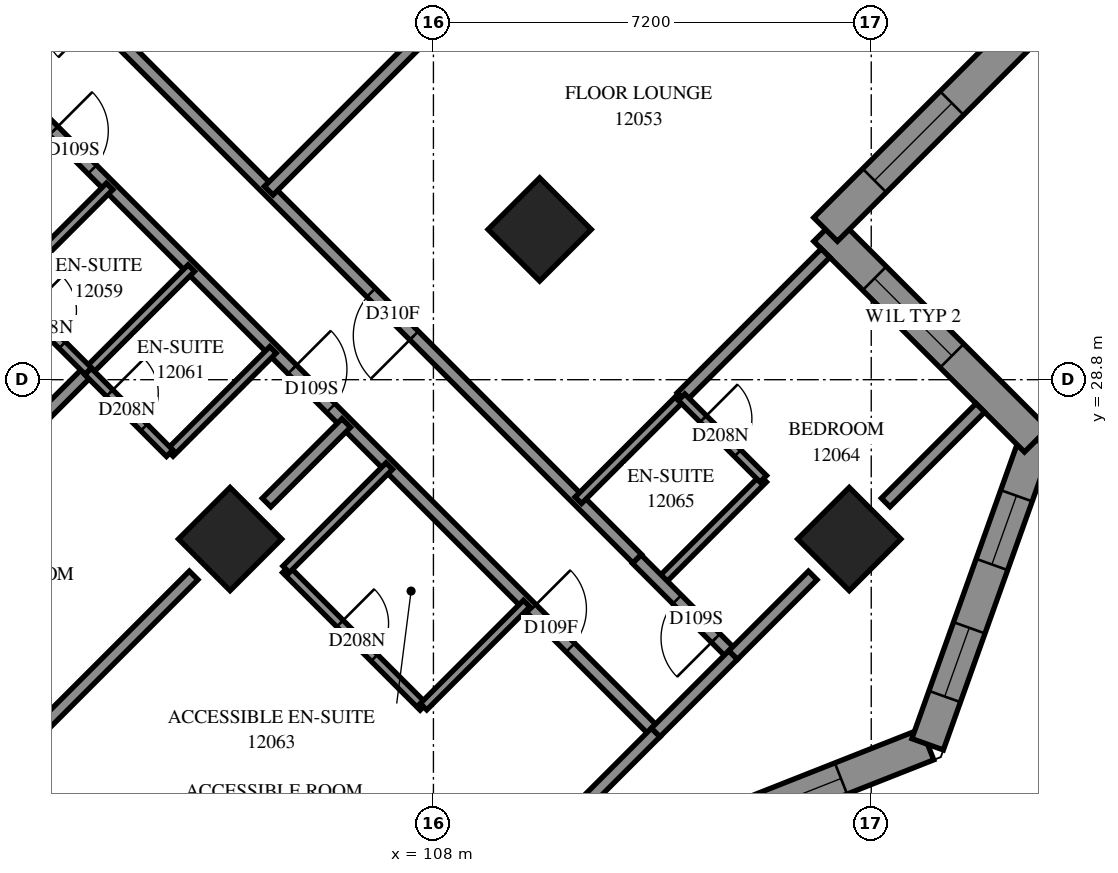
"""IFC4 building model, lengths in metres.
Left out: names, types, materials, properties, quantities, classifications, styles, units other than length and angle.
Written with IfcOpenShell. Run it as: python <this file> out.ifc"""

import sys

from ifc_helpers import new_model, si_unit, direction, frame, frame_2d, origin, origin_2d, place, context, subcontext, project, spatial, polyline, rectangle, outline, extrude, element, fill, save


model = new_model("IFC4")
c1 = context("Model", 3, precision=1e-05, world=origin(), true_north=direction((0.0, 1.0)))
c2 = subcontext(c1, "Body", "Model", "MODEL_VIEW")
j1 = project(units=[si_unit("LENGTHUNIT", "METRE"), si_unit("PLANEANGLEUNIT", "RADIAN")], contexts=[c1])
p1 = place(None, origin())
s1 = spatial("IfcSite", under=j1, at=p1, CompositionType="ELEMENT")
p2 = place(p1, origin())
s2 = spatial("IfcBuilding", under=s1, at=p2, CompositionType="ELEMENT")
p3 = place(p2, frame((0.0, 0.0, 47.4)))
s3 = spatial("IfcBuildingStorey", under=s2, at=p3, CompositionType="ELEMENT", Elevation=47.4)
for number, where, z_axis, x_axis in (
    (1, (109.747, 31.271, 0.0), (0.0, 0.0, 1.0), (0.707, -0.707, 0.0)),
    (2, (104.656, 26.18, 0.0), (0.0, 0.0, 1.0), (0.707, -0.707, 0.0)),
    (3, (114.838, 26.18, 0.0), (0.0, 0.0, 1.0), (0.707, -0.707, 0.0)),
):
    element("IfcColumn", number, at=place(p3, frame(where, z_axis=z_axis, x_axis=x_axis)), inside=s3, PredefinedType="COLUMN", context=c2, shape_type="SweptSolid", body=[
        extrude(rectangle(XDim=1.2, YDim=1.2, at=origin_2d()), origin(), (0.0, 0.0, 1.0), 3.1),
    ])
p4 = place(p3, frame((110.991, 20.776, 0.0), z_axis=(0.0, 0.0, 1.0), x_axis=(0.9301285259, 0.3672341559, 0.0)))
e4 = element("IfcWall", 4, at=p4, inside=s3, PredefinedType="SOLIDWALL", context=c2, shape_type="SweptSolid", body=[
    extrude(outline(polyline([(0.119, -0.275), (5.646, -0.275), (5.397, 0.275), (-0.119, 0.275), (0.119, -0.275)])), origin(), (0.0, 0.0, 1.0), 3.1),
])
p5 = place(p4, frame((1.19, 0.0, 0.5)))
e5 = element("IfcOpeningElement", 5, at=p5, cuts=e4, PredefinedType="OPENING", context=c2, shape_type="SweptSolid", body=[
    extrude(rectangle(XDim=2.8, YDim=2.45, at=frame_2d((1.4, 1.225))), frame((0.0, 0.285, 0.0), z_axis=(0.0, -1.0, 0.0), x_axis=(1.0, 0.0, 0.0)), (0.0, 0.0, 1.0), 0.57),
])
p6 = place(p3, frame((116.127, 22.804, 0.0), z_axis=(0.0, 0.0, 1.0), x_axis=(0.3366083403, 0.9416447447, 0.0)))
e6 = element("IfcWall", 6, at=p6, inside=s3, PredefinedType="SOLIDWALL", context=c2, shape_type="SweptSolid", body=[
    extrude(outline(polyline([(-0.125, -0.275), (5.485, -0.275), (5.137, 0.275), (0.125, 0.275), (-0.125, -0.275)])), origin(), (0.0, 0.0, 1.0), 3.1),
])
p7 = place(p6, frame((0.835, 0.0, 0.5)))
e7 = element("IfcOpeningElement", 7, at=p7, cuts=e6, PredefinedType="OPENING", context=c2, shape_type="SweptSolid", body=[
    extrude(rectangle(XDim=1.2, YDim=2.45, at=frame_2d((0.6, 1.225))), frame((0.0, 0.285, 0.0), z_axis=(0.0, -1.0, 0.0), x_axis=(1.0, 0.0, 0.0)), (0.0, 0.0, 1.0), 0.57),
])
p8 = place(p6, frame((3.141, 0.0, 0.5)))
e8 = element("IfcOpeningElement", 8, at=p8, cuts=e6, PredefinedType="OPENING", context=c2, shape_type="SweptSolid", body=[
    extrude(rectangle(XDim=1.2, YDim=2.45, at=frame_2d((0.6, 1.225))), frame((0.0, 0.285, 0.0), z_axis=(0.0, -1.0, 0.0), x_axis=(1.0, 0.0, 0.0)), (0.0, 0.0, 1.0), 0.57),
])
p9 = place(p3, frame((117.915, 27.805, 0.0), z_axis=(0.0, 0.0, 1.0), x_axis=(-0.7070965789, 0.7071169833, 0.0)))
e9 = element("IfcWall", 9, at=p9, inside=s3, PredefinedType="SOLIDWALL", context=c2, shape_type="SweptSolid", body=[
    extrude(outline(polyline([(-0.174, -0.275), (4.626, -0.275), (5.176, 0.275), (0.174, 0.275), (-0.174, -0.275)])), origin(), (0.0, 0.0, 1.0), 3.1),
])
p10 = place(p9, frame((1.963, 0.0, 0.6)))
e10 = element("IfcOpeningElement", 10, at=p10, cuts=e9, PredefinedType="OPENING", context=c2, shape_type="SweptSolid", body=[
    extrude(rectangle(XDim=1.8, YDim=1.9, at=frame_2d((0.9, 0.95))), frame((0.0, 0.285, 0.0), z_axis=(0.0, -1.0, 0.0), x_axis=(1.0, 0.0, 0.0)), (0.0, 0.0, 1.0), 0.57),
])
p11 = place(p3, frame((114.449, 31.271, 0.0), z_axis=(0.0, 0.0, 1.0), x_axis=(0.7070981337, 0.7071154285, 0.0)))
e11 = element("IfcWall", 11, at=p11, inside=s3, PredefinedType="SOLIDWALL", context=c2, shape_type="SweptSolid", body=[
    extrude(outline(polyline([(0.275, -0.275), (6.157, -0.275), (5.407, 0.275), (-0.275, 0.275), (0.275, -0.275)])), origin(), (0.0, 0.0, 1.0), 3.1),
])
p12 = place(p11, frame((1.137, 0.0, 0.6)))
e12 = element("IfcOpeningElement", 12, at=p12, cuts=e11, PredefinedType="OPENING", context=c2, shape_type="SweptSolid", body=[
    extrude(rectangle(XDim=1.8, YDim=1.9, at=frame_2d((0.9, 0.95))), frame((0.0, 0.285, 0.0), z_axis=(0.0, -1.0, 0.0), x_axis=(1.0, 0.0, 0.0)), (0.0, 0.0, 1.0), 0.57),
])
p13 = place(p3, frame((93.481, 41.167, 0.0), z_axis=(0.0, 0.0, 1.0), x_axis=(0.7071067812, -0.7071067812, 0.0)))
e13 = element("IfcWall", 13, at=p13, inside=s3, PredefinedType="PARTITIONING", context=c2, shape_type="SweptSolid", body=[
    extrude(rectangle(XDim=25.699, YDim=0.2, at=frame_2d((12.85, 0.0))), origin(), (0.0, 0.0, 1.0), 3.1),
])
p14 = place(p13, frame((2.8, 0.0, 0.0)))
e14 = element("IfcOpeningElement", 14, at=p14, cuts=e13, PredefinedType="OPENING", context=c2, shape_type="SweptSolid", body=[
    extrude(rectangle(XDim=0.9, YDim=2.1, at=frame_2d((0.45, 1.05))), frame((0.0, 0.11, 0.0), z_axis=(0.0, -1.0, 0.0), x_axis=(1.0, 0.0, 0.0)), (0.0, 0.0, 1.0), 0.22),
])
p15 = place(p13, frame((9.948, 0.0, 0.0)))
e15 = element("IfcOpeningElement", 15, at=p15, cuts=e13, PredefinedType="OPENING", context=c2, shape_type="SweptSolid", body=[
    extrude(rectangle(XDim=0.9, YDim=2.1, at=frame_2d((0.45, 1.05))), frame((0.0, 0.11, 0.0), z_axis=(0.0, -1.0, 0.0), x_axis=(1.0, 0.0, 0.0)), (0.0, 0.0, 1.0), 0.22),
])
p16 = place(p13, frame((11.7, 0.0, 0.0)))
e16 = element("IfcOpeningElement", 16, at=p16, cuts=e13, PredefinedType="OPENING", context=c2, shape_type="SweptSolid", body=[
    extrude(rectangle(XDim=0.9, YDim=2.1, at=frame_2d((0.45, 1.05))), frame((0.0, 0.11, 0.0), z_axis=(0.0, -1.0, 0.0), x_axis=(1.0, 0.0, 0.0)), (0.0, 0.0, 1.0), 0.22),
])
p17 = place(p13, frame((17.25, 0.0, 0.0)))
e17 = element("IfcOpeningElement", 17, at=p17, cuts=e13, PredefinedType="OPENING", context=c2, shape_type="SweptSolid", body=[
    extrude(rectangle(XDim=0.9, YDim=2.1, at=frame_2d((0.45, 1.05))), frame((0.0, 0.11, 0.0), z_axis=(0.0, -1.0, 0.0), x_axis=(1.0, 0.0, 0.0)), (0.0, 0.0, 1.0), 0.22),
])
p18 = place(p13, frame((22.82, 0.0, 0.0)))
e18 = element("IfcOpeningElement", 18, at=p18, cuts=e13, PredefinedType="OPENING", context=c2, shape_type="SweptSolid", body=[
    extrude(rectangle(XDim=0.9, YDim=2.1, at=frame_2d((0.45, 1.05))), frame((0.0, 0.11, 0.0), z_axis=(0.0, -1.0, 0.0), x_axis=(1.0, 0.0, 0.0)), (0.0, 0.0, 1.0), 0.22),
])
p19 = place(p3, frame((111.352, 25.855, 0.0), z_axis=(0.0, 0.0, 1.0), x_axis=(-0.7070418597, 0.7071716967, 0.0)))
e19 = element("IfcWall", 19, at=p19, inside=s3, PredefinedType="PARTITIONING", context=c2, shape_type="SweptSolid", body=[
    extrude(rectangle(XDim=13.864, YDim=0.2, at=frame_2d((6.932, 0.0))), origin(), (0.0, 0.0, 1.0), 3.1),
])
p20 = place(p19, frame((12.564, 0.0, 0.0)))
e20 = element("IfcOpeningElement", 20, at=p20, cuts=e19, PredefinedType="OPENING", context=c2, shape_type="SweptSolid", body=[
    extrude(rectangle(XDim=0.9, YDim=2.1, at=frame_2d((0.45, 1.05))), frame((0.0, 0.11, 0.0), z_axis=(0.0, -1.0, 0.0), x_axis=(1.0, 0.0, 0.0)), (0.0, 0.0, 1.0), 0.22),
])
p21 = place(p19, frame((5.19, 0.0, 0.0)))
e21 = element("IfcOpeningElement", 21, at=p21, cuts=e19, PredefinedType="OPENING", context=c2, shape_type="SweptSolid", body=[
    extrude(rectangle(XDim=1.0, YDim=2.1, at=frame_2d((0.5, 1.05))), frame((0.0, 0.11, 0.0), z_axis=(0.0, -1.0, 0.0), x_axis=(1.0, 0.0, 0.0)), (0.0, 0.0, 1.0), 0.22),
])
p22 = place(p3, frame((105.292, 31.908, 0.0), z_axis=(0.0, 0.0, 1.0), x_axis=(0.7071067812, 0.7071067812, 0.0)))
e22 = element("IfcWall", 22, at=p22, inside=s3, PredefinedType="PARTITIONING", context=c2, shape_type="SweptSolid", body=[
    extrude(rectangle(XDim=10.979, YDim=0.2, at=frame_2d((5.49, 0.0))), origin(), (0.0, 0.0, 1.0), 3.1),
])
p23 = place(p3, frame((96.528, 23.144, 0.0), z_axis=(0.0, 0.0, 1.0), x_axis=(0.7071067812, 0.7071067812, 0.0)))
e23 = element("IfcWall", 23, at=p23, inside=s3, PredefinedType="PARTITIONING", context=c2, shape_type="SweptSolid", body=[
    extrude(rectangle(XDim=8.195, YDim=0.2, at=frame_2d((4.098, 0.0))), origin(), (0.0, 0.0, 1.0), 3.1),
])
p24 = place(p3, frame((100.162, 21.688, 0.0), z_axis=(0.0, 0.0, 1.0), x_axis=(0.7071067812, 0.7071067812, 0.0)))
e24 = element("IfcWall", 24, at=p24, inside=s3, PredefinedType="PARTITIONING", context=c2, shape_type="SweptSolid", body=[
    extrude(rectangle(XDim=5.507, YDim=0.2, at=frame_2d((2.753, 0.0))), origin(), (0.0, 0.0, 1.0), 3.1),
])
p25 = place(p3, frame((112.079, 28.513, 0.0), z_axis=(0.0, 0.0, 1.0), x_axis=(0.7071067812, 0.7071067812, 0.0)))
e25 = element("IfcWall", 25, at=p25, inside=s3, PredefinedType="PARTITIONING", context=c2, shape_type="SweptSolid", body=[
    extrude(rectangle(XDim=3.351, YDim=0.2, at=frame_2d((1.675, 0.0))), origin(), (0.0, 0.0, 1.0), 3.1),
])
p26 = place(p3, frame((105.573, 25.681, 0.0), z_axis=(0.0, 0.0, 1.0), x_axis=(0.7071067812, -0.7071067812, 0.0)))
e26 = element("IfcWall", 26, at=p26, inside=s3, PredefinedType="PARTITIONING", context=c2, shape_type="SweptSolid", body=[
    extrude(rectangle(XDim=3.199, YDim=0.15, at=frame_2d((1.599, 0.0))), origin(), (0.0, 0.0, 1.0), 3.1),
])
p27 = place(p26, frame((1.258, 0.0, 0.0)))
e27 = element("IfcOpeningElement", 27, at=p27, cuts=e26, PredefinedType="OPENING", context=c2, shape_type="SweptSolid", body=[
    extrude(rectangle(XDim=0.8, YDim=2.1, at=frame_2d((0.4, 1.05))), frame((0.0, 0.085, 0.0), z_axis=(0.0, -1.0, 0.0), x_axis=(1.0, 0.0, 0.0)), (0.0, 0.0, 1.0), 0.17),
])
for number, where, z_axis, x_axis in (
    (28, (100.977, 30.281, 0.0), (0.0, 0.0, 1.0), (0.707, 0.707, 0.0)),
    (29, (111.725, 25.473, 0.0), (0.0, 0.0, 1.0), (0.707, 0.707, 0.0)),
):
    element("IfcWall", number, at=place(p3, frame(where, z_axis=z_axis, x_axis=x_axis)), inside=s3, PredefinedType="PARTITIONING", context=c2, shape_type="SweptSolid", body=[
        extrude(rectangle(XDim=2.401, YDim=0.15, at=frame_2d((1.201, 0.0))), origin(), (0.0, 0.0, 1.0), 3.1),
    ])
p28 = place(p3, frame((105.578, 25.682, 0.0), z_axis=(0.0, 0.0, 1.0), x_axis=(0.706689978, 0.7075233388, 0.0)))
e30 = element("IfcWall", 30, at=p28, inside=s3, PredefinedType="PARTITIONING", context=c2, shape_type="SweptSolid", body=[
    extrude(rectangle(XDim=2.4, YDim=0.15, at=frame_2d((1.2, 0.0))), origin(), (0.0, 0.0, 1.0), 3.1),
])
for number, where, z_axis, x_axis in (
    (31, (110.383, 26.817, 0.0), (0.0, 0.0, 1.0), (0.707, 0.707, 0.0)),
    (32, (102.323, 28.939, 0.0), (0.0, 0.0, 1.0), (0.707, 0.707, 0.0)),
    (33, (103.665, 27.595, 0.0), (0.0, 0.0, 1.0), (0.707, 0.707, 0.0)),
    (34, (107.837, 23.423, 0.0), (0.0, 0.0, 1.0), (0.707, 0.707, 0.0)),
):
    element("IfcWall", number, at=place(p3, frame(where, z_axis=z_axis, x_axis=x_axis)), inside=s3, PredefinedType="PARTITIONING", context=c2, shape_type="SweptSolid", body=[
        extrude(rectangle(XDim=2.398, YDim=0.15, at=frame_2d((1.199, 0.0))), origin(), (0.0, 0.0, 1.0), 3.1),
    ])
p29 = place(p3, frame((112.925, 24.267, 0.0), z_axis=(0.0, 0.0, 1.0), x_axis=(-0.7068383786, 0.707375082, 0.0)))
e35 = element("IfcWall", 35, at=p29, inside=s3, PredefinedType="PARTITIONING", context=c2, shape_type="SweptSolid", body=[
    extrude(rectangle(XDim=2.236, YDim=0.2, at=frame_2d((1.118, 0.0))), origin(), (0.0, 0.0, 1.0), 3.1),
])
p30 = place(p29, frame((0.4, 0.0, 0.0)))
e36 = element("IfcOpeningElement", 36, at=p30, cuts=e35, PredefinedType="OPENING", context=c2, shape_type="SweptSolid", body=[
    extrude(rectangle(XDim=0.9, YDim=2.1, at=frame_2d((0.45, 1.05))), frame((0.0, 0.11, 0.0), z_axis=(0.0, -1.0, 0.0), x_axis=(1.0, 0.0, 0.0)), (0.0, 0.0, 1.0), 0.22),
])
p31 = place(p3, frame((115.438, 26.78, 0.0), z_axis=(0.0, 0.0, 1.0), x_axis=(0.7071067812, 0.7071067812, 0.0)))
e37 = element("IfcWall", 37, at=p31, inside=s3, PredefinedType="PARTITIONING", context=c2, shape_type="SweptSolid", body=[
    extrude(rectangle(XDim=2.201, YDim=0.2, at=frame_2d((1.101, 0.0))), origin(), (0.0, 0.0, 1.0), 3.1),
])
p32 = place(p3, frame((100.981, 30.283, 0.0), z_axis=(0.0, 0.0, 1.0), x_axis=(0.7076330979, -0.7065800724, 0.0)))
e38 = element("IfcWall", 38, at=p32, inside=s3, PredefinedType="PARTITIONING", context=c2, shape_type="SweptSolid", body=[
    extrude(rectangle(XDim=1.899, YDim=0.15, at=frame_2d((0.95, 0.0))), origin(), (0.0, 0.0, 1.0), 3.1),
])
p33 = place(p32, frame((0.493, 0.0, 0.0)))
e39 = element("IfcOpeningElement", 39, at=p33, cuts=e38, PredefinedType="OPENING", context=c2, shape_type="SweptSolid", body=[
    extrude(rectangle(XDim=0.8, YDim=2.1, at=frame_2d((0.4, 1.05))), frame((0.0, 0.085, 0.0), z_axis=(0.0, -1.0, 0.0), x_axis=(1.0, 0.0, 0.0)), (0.0, 0.0, 1.0), 0.17),
])
p34 = place(p3, frame((102.321, 28.935, 0.0), z_axis=(0.0, 0.0, 1.0), x_axis=(0.7065800724, -0.7076330979, 0.0)))
e40 = element("IfcWall", 40, at=p34, inside=s3, PredefinedType="PARTITIONING", context=c2, shape_type="SweptSolid", body=[
    extrude(rectangle(XDim=1.899, YDim=0.15, at=frame_2d((0.95, 0.0))), origin(), (0.0, 0.0, 1.0), 3.1),
])
p35 = place(p34, frame((0.501, 0.0, 0.0)))
e41 = element("IfcOpeningElement", 41, at=p35, cuts=e40, PredefinedType="OPENING", context=c2, shape_type="SweptSolid", body=[
    extrude(rectangle(XDim=0.8, YDim=2.1, at=frame_2d((0.4, 1.05))), frame((0.0, 0.085, 0.0), z_axis=(0.0, -1.0, 0.0), x_axis=(1.0, 0.0, 0.0)), (0.0, 0.0, 1.0), 0.17),
])
p36 = place(p3, frame((112.08, 28.512, 0.0), z_axis=(0.0, 0.0, 1.0), x_axis=(0.7076330979, -0.7065800724, 0.0)))
e42 = element("IfcWall", 42, at=p36, inside=s3, PredefinedType="PARTITIONING", context=c2, shape_type="SweptSolid", body=[
    extrude(rectangle(XDim=1.899, YDim=0.15, at=frame_2d((0.95, 0.0))), origin(), (0.0, 0.0, 1.0), 3.1),
])
p37 = place(p36, frame((0.505, 0.0, 0.0)))
e43 = element("IfcOpeningElement", 43, at=p37, cuts=e42, PredefinedType="OPENING", context=c2, shape_type="SweptSolid", body=[
    extrude(rectangle(XDim=0.8, YDim=2.1, at=frame_2d((0.4, 1.05))), frame((0.0, 0.085, 0.0), z_axis=(0.0, -1.0, 0.0), x_axis=(1.0, 0.0, 0.0)), (0.0, 0.0, 1.0), 0.17),
])
for number, where, z_axis, x_axis in (
    (44, (110.346, 21.689, 0.0), (0.0, 0.0, 1.0), (0.707, 0.707, 0.0)),
    (45, (112.927, 24.27, 0.0), (0.0, 0.0, 1.0), (0.707, 0.707, 0.0)),
):
    element("IfcWall", number, at=place(p3, frame(where, z_axis=z_axis, x_axis=x_axis)), inside=s3, PredefinedType="PARTITIONING", context=c2, shape_type="SweptSolid", body=[
        extrude(rectangle(XDim=1.853, YDim=0.2, at=frame_2d((0.926, 0.0))), origin(), (0.0, 0.0, 1.0), 2.6),
    ])
p38 = place(p3, frame((105.256, 26.78, 0.0), z_axis=(0.0, 0.0, 1.0), x_axis=(0.7076467632, 0.7065663865, 0.0)))
e46 = element("IfcWall", 46, at=p38, inside=s3, PredefinedType="PARTITIONING", context=c2, shape_type="SweptSolid", body=[
    extrude(rectangle(XDim=1.851, YDim=0.2, at=frame_2d((0.926, 0.0))), origin(), (0.0, 0.0, 1.0), 3.1),
])
p39 = place(p3, frame((111.656, 22.998, 0.0), z_axis=(0.0, 0.0, 1.0), x_axis=(0.7071067812, 0.7071067812, 0.0)))
e47 = element("IfcWall", 47, at=p39, inside=s3, PredefinedType="PARTITIONING", context=c2, shape_type="SweptSolid", body=[
    extrude(rectangle(XDim=1.799, YDim=0.2, at=frame_2d((0.899, 0.0))), origin(), (0.0, 0.0, 1.0), 2.6),
])
p40 = place(p5, origin())
e48 = element("IfcWindow", 48, at=p40, inside=s3, PartitioningType="SINGLE_PANEL", PredefinedType="WINDOW", context=c2, shape_type="SweptSolid", body=[
    extrude(rectangle(XDim=2.8, YDim=2.45, at=frame_2d((1.4, 1.225))), frame((0.0, 0.155, 0.0), z_axis=(0.0, -1.0, 0.0), x_axis=(1.0, 0.0, 0.0)), (0.0, 0.0, 1.0), 0.06),
])
fill(e5, e48)
p41 = place(p7, origin())
e49 = element("IfcWindow", 49, at=p41, inside=s3, PartitioningType="SINGLE_PANEL", PredefinedType="WINDOW", context=c2, shape_type="SweptSolid", body=[
    extrude(rectangle(XDim=1.2, YDim=2.45, at=frame_2d((0.6, 1.225))), frame((0.0, 0.155, 0.0), z_axis=(0.0, -1.0, 0.0), x_axis=(1.0, 0.0, 0.0)), (0.0, 0.0, 1.0), 0.06),
])
fill(e7, e49)
p42 = place(p8, origin())
e50 = element("IfcWindow", 50, at=p42, inside=s3, PartitioningType="SINGLE_PANEL", PredefinedType="WINDOW", context=c2, shape_type="SweptSolid", body=[
    extrude(rectangle(XDim=1.2, YDim=2.45, at=frame_2d((0.6, 1.225))), frame((0.0, 0.155, 0.0), z_axis=(0.0, -1.0, 0.0), x_axis=(1.0, 0.0, 0.0)), (0.0, 0.0, 1.0), 0.06),
])
fill(e8, e50)
p43 = place(p10, origin())
e51 = element("IfcWindow", 51, at=p43, inside=s3, PartitioningType="SINGLE_PANEL", PredefinedType="WINDOW", context=c2, shape_type="SweptSolid", body=[
    extrude(rectangle(XDim=1.8, YDim=1.9, at=frame_2d((0.9, 0.95))), frame((0.0, 0.155, 0.0), z_axis=(0.0, -1.0, 0.0), x_axis=(1.0, 0.0, 0.0)), (0.0, 0.0, 1.0), 0.06),
])
fill(e10, e51)
p44 = place(p12, origin())
e52 = element("IfcWindow", 52, at=p44, inside=s3, PartitioningType="SINGLE_PANEL", PredefinedType="WINDOW", context=c2, shape_type="SweptSolid", body=[
    extrude(rectangle(XDim=1.8, YDim=1.9, at=frame_2d((0.9, 0.95))), frame((0.0, 0.155, 0.0), z_axis=(0.0, -1.0, 0.0), x_axis=(1.0, 0.0, 0.0)), (0.0, 0.0, 1.0), 0.06),
])
fill(e12, e52)
p45 = place(p21, origin())
e53 = element("IfcDoor", 53, at=p45, inside=s3, OperationType="SINGLE_SWING_RIGHT", PredefinedType="DOOR", context=c2, shape_type="SweptSolid", body=[
    extrude(rectangle(XDim=1.0, YDim=2.1, at=frame_2d((0.5, 1.05))), frame((0.0, 0.025, 0.0), z_axis=(0.0, -1.0, 0.0), x_axis=(1.0, 0.0, 0.0)), (0.0, 0.0, 1.0), 0.05),
])
fill(e21, e53)
p46 = place(p16, origin())
e54 = element("IfcDoor", 54, at=p46, inside=s3, OperationType="SINGLE_SWING_RIGHT", PredefinedType="DOOR", context=c2, shape_type="SweptSolid", body=[
    extrude(rectangle(XDim=0.9, YDim=2.1, at=frame_2d((0.45, 1.05))), frame((0.0, 0.025, 0.0), z_axis=(0.0, -1.0, 0.0), x_axis=(1.0, 0.0, 0.0)), (0.0, 0.0, 1.0), 0.05),
])
fill(e16, e54)
p47 = place(p33, origin())
e55 = element("IfcDoor", 55, at=p47, inside=s3, OperationType="SINGLE_SWING_RIGHT", PredefinedType="DOOR", context=c2, shape_type="SweptSolid", body=[
    extrude(rectangle(XDim=0.8, YDim=2.1, at=frame_2d((0.4, 1.05))), frame((0.0, 0.025, 0.0), z_axis=(0.0, -1.0, 0.0), x_axis=(1.0, 0.0, 0.0)), (0.0, 0.0, 1.0), 0.05),
])
fill(e39, e55)
p48 = place(p17, origin())
e56 = element("IfcDoor", 56, at=p48, inside=s3, OperationType="SINGLE_SWING_LEFT", PredefinedType="DOOR", context=c2, shape_type="SweptSolid", body=[
    extrude(rectangle(XDim=0.9, YDim=2.1, at=frame_2d((0.45, 1.05))), frame((0.0, 0.025, 0.0), z_axis=(0.0, -1.0, 0.0), x_axis=(1.0, 0.0, 0.0)), (0.0, 0.0, 1.0), 0.05),
])
fill(e17, e56)
p49 = place(p35, origin())
e57 = element("IfcDoor", 57, at=p49, inside=s3, OperationType="SINGLE_SWING_RIGHT", PredefinedType="DOOR", context=c2, shape_type="SweptSolid", body=[
    extrude(rectangle(XDim=0.8, YDim=2.1, at=frame_2d((0.4, 1.05))), frame((0.0, 0.025, 0.0), z_axis=(0.0, -1.0, 0.0), x_axis=(1.0, 0.0, 0.0)), (0.0, 0.0, 1.0), 0.05),
])
fill(e41, e57)
p50 = place(p18, origin())
e58 = element("IfcDoor", 58, at=p50, inside=s3, OperationType="SINGLE_SWING_RIGHT", PredefinedType="DOOR", context=c2, shape_type="SweptSolid", body=[
    extrude(rectangle(XDim=0.9, YDim=2.1, at=frame_2d((0.45, 1.05))), frame((0.0, 0.025, 0.0), z_axis=(0.0, -1.0, 0.0), x_axis=(1.0, 0.0, 0.0)), (0.0, 0.0, 1.0), 0.05),
])
fill(e18, e58)
p51 = place(p27, origin())
e59 = element("IfcDoor", 59, at=p51, inside=s3, OperationType="SINGLE_SWING_RIGHT", PredefinedType="DOOR", context=c2, shape_type="SweptSolid", body=[
    extrude(rectangle(XDim=0.8, YDim=2.1, at=frame_2d((0.4, 1.05))), frame((0.0, 0.025, 0.0), z_axis=(0.0, -1.0, 0.0), x_axis=(1.0, 0.0, 0.0)), (0.0, 0.0, 1.0), 0.05),
])
fill(e27, e59)
p52 = place(p30, origin())
e60 = element("IfcDoor", 60, at=p52, inside=s3, OperationType="SINGLE_SWING_RIGHT", PredefinedType="DOOR", context=c2, shape_type="SweptSolid", body=[
    extrude(rectangle(XDim=0.9, YDim=2.1, at=frame_2d((0.45, 1.05))), frame((0.0, 0.025, 0.0), z_axis=(0.0, -1.0, 0.0), x_axis=(1.0, 0.0, 0.0)), (0.0, 0.0, 1.0), 0.05),
])
fill(e36, e60)
p53 = place(p37, origin())
e61 = element("IfcDoor", 61, at=p53, inside=s3, OperationType="SINGLE_SWING_RIGHT", PredefinedType="DOOR", context=c2, shape_type="SweptSolid", body=[
    extrude(rectangle(XDim=0.8, YDim=2.1, at=frame_2d((0.4, 1.05))), frame((0.0, 0.025, 0.0), z_axis=(0.0, -1.0, 0.0), x_axis=(1.0, 0.0, 0.0)), (0.0, 0.0, 1.0), 0.05),
])
fill(e43, e61)
save(model, sys.argv[1])
